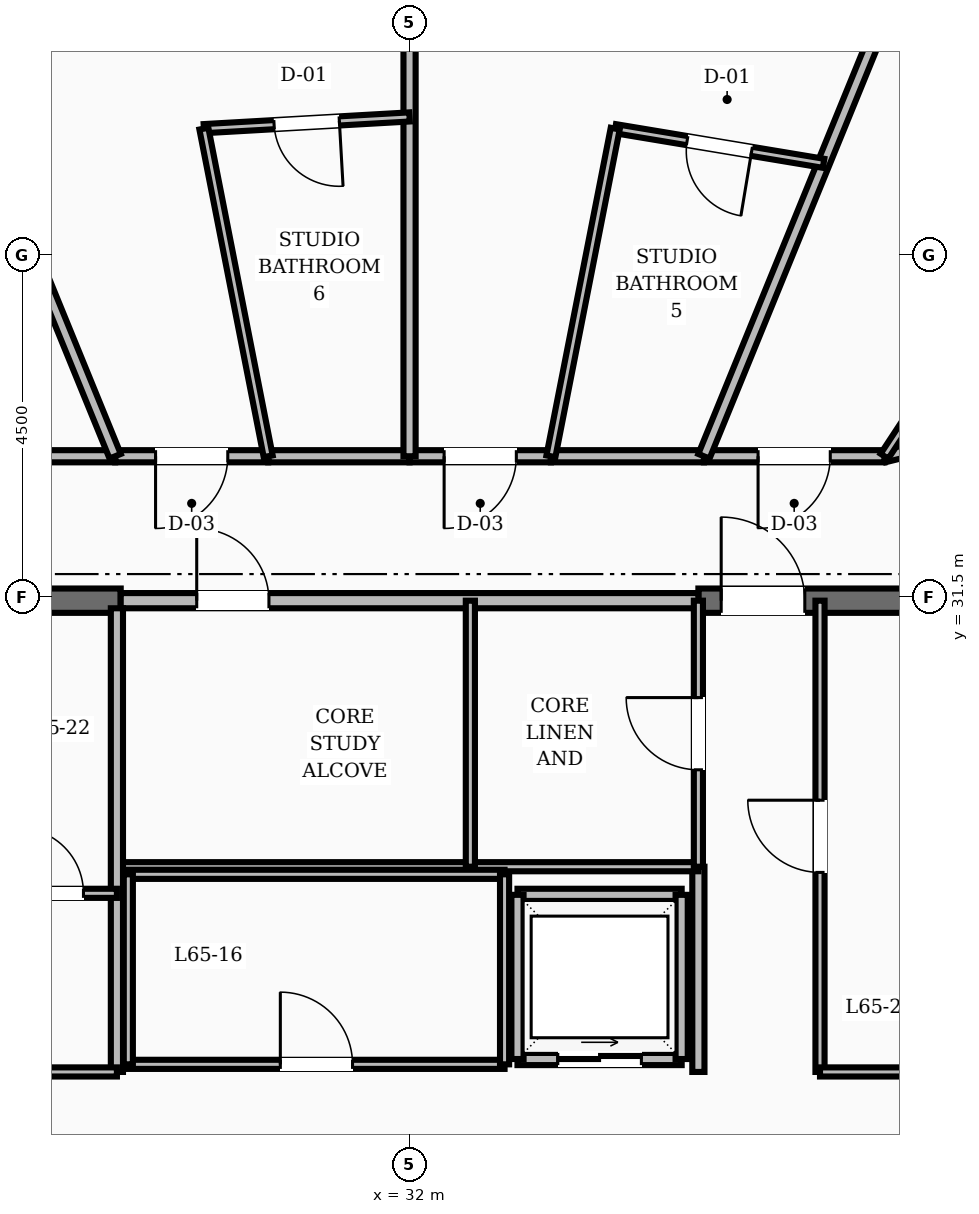
"""IFC4 building model, lengths in metres.
Left out: names, types, materials, properties, quantities, classifications, styles, units other than length and angle.
Written with IfcOpenShell. Run it as: python <this file> out.ifc"""

import sys

from ifc_helpers import new_model, si_unit, direction, frame, frame_2d, origin, place, context, subcontext, project, spatial, rectangle, extrude, element, fill, save


model = new_model("IFC4")
c1 = context("Model", 3, precision=1e-05, world=origin(), true_north=direction((0.0, 1.0)))
c2 = subcontext(c1, "Body", "Model", "MODEL_VIEW")
j1 = project(units=[si_unit("LENGTHUNIT", "METRE"), si_unit("PLANEANGLEUNIT", "RADIAN")], contexts=[c1])
p1 = place(None, origin())
s1 = spatial("IfcSite", under=j1, at=p1, CompositionType="ELEMENT")
p2 = place(p1, origin())
s2 = spatial("IfcBuilding", under=s1, at=p2, CompositionType="ELEMENT")
p3 = place(p2, frame((0.0, 0.0, 250.8)))
s3 = spatial("IfcBuildingStorey", under=s2, at=p3, CompositionType="ELEMENT", Elevation=250.8)
p4 = place(p3, frame((24.96, 31.45, 0.0), z_axis=(0.0, 0.0, 1.0), x_axis=(1.0, 0.0, 0.0)))
e1 = element("IfcWall", 1, at=p4, inside=s3, PredefinedType="SHEAR", context=c2, shape_type="SweptSolid", body=[
    extrude(rectangle(XDim=3.24, YDim=0.32, at=frame_2d((1.62, 0.0))), origin(), (0.0, 0.0, 1.0), 3.6),
])
p5 = place(p3, frame((35.8, 31.45, 0.0), z_axis=(0.0, 0.0, 1.0), x_axis=(1.0, 0.0, 0.0)))
e2 = element("IfcWall", 2, at=p5, inside=s3, PredefinedType="SHEAR", context=c2, shape_type="SweptSolid", body=[
    extrude(rectangle(XDim=3.24, YDim=0.32, at=frame_2d((1.62, 0.0))), origin(), (0.0, 0.0, 1.0), 3.6),
])
p6 = place(p5, frame((0.3, 0.0, 0.0)))
e3 = element("IfcOpeningElement", 3, at=p6, cuts=e2, PredefinedType="OPENING", context=c2, shape_type="SweptSolid", body=[
    extrude(rectangle(XDim=1.1, YDim=2.1, at=frame_2d((0.55, 1.05))), frame((0.0, 0.17, 0.0), z_axis=(0.0, -1.0, 0.0), x_axis=(1.0, 0.0, 0.0)), (0.0, 0.0, 1.0), 0.34),
])
p7 = place(p3, frame((35.8, 25.25, 0.0), z_axis=(0.0, 0.0, 1.0), x_axis=(0.0, 1.0, 0.0)))
e4 = element("IfcWall", 4, at=p7, inside=s3, PredefinedType="SOLIDWALL", context=c2, shape_type="SweptSolid", body=[
    extrude(rectangle(XDim=2.7, YDim=0.16, at=frame_2d((1.35, 0.0))), origin(), (0.0, 0.0, 1.0), 2.87),
])
p8 = place(p3, frame((33.42, 25.42, 0.0), z_axis=(0.0, 0.0, 1.0), x_axis=(1.0, 0.0, 0.0)))
e5 = element("IfcWall", 5, at=p8, inside=s3, PredefinedType="SOLIDWALL", context=c2, shape_type="SweptSolid", body=[
    extrude(rectangle(XDim=2.16, YDim=0.16, at=frame_2d((1.08, 0.0))), origin(), (0.0, 0.0, 1.0), 2.87),
])
p9 = place(p8, frame((0.53, 0.0, 0.0)))
e6 = element("IfcOpeningElement", 6, at=p9, cuts=e5, PredefinedType="OPENING", context=c2, shape_type="SweptSolid", body=[
    extrude(rectangle(XDim=1.1, YDim=2.15, at=frame_2d((0.55, 1.075))), frame((0.0, 0.09, 0.0), z_axis=(0.0, -1.0, 0.0), x_axis=(1.0, 0.0, 0.0)), (0.0, 0.0, 1.0), 0.18),
])
for number, where, z_axis, x_axis in (
    (7, (33.42, 27.58, 0.0), (0.0, 0.0, 1.0), (1.0, 0.0, 0.0)),
    (8, (33.42, 25.42, 0.0), (0.0, 0.0, 1.0), (0.0, 1.0, 0.0)),
    (9, (35.58, 25.42, 0.0), (0.0, 0.0, 1.0), (0.0, 1.0, 0.0)),
):
    element("IfcWall", number, at=place(p3, frame(where, z_axis=z_axis, x_axis=x_axis)), inside=s3, PredefinedType="SOLIDWALL", context=c2, shape_type="SweptSolid", body=[
        extrude(rectangle(XDim=2.16, YDim=0.16, at=frame_2d((1.08, 0.0))), origin(), (0.0, 0.0, 1.0), 2.87),
    ])
p10 = place(p3, frame((28.2, 31.45, 0.0), z_axis=(0.0, 0.0, 1.0), x_axis=(1.0, 0.0, 0.0)))
e10 = element("IfcWall", 10, at=p10, inside=s3, PredefinedType="SOLIDWALL", context=c2, shape_type="SweptSolid", body=[
    extrude(rectangle(XDim=7.6, YDim=0.2, at=frame_2d((3.8, 0.0))), origin(), (0.0, 0.0, 1.0), 2.87),
])
p11 = place(p10, frame((1.0, 0.0, 0.0)))
e11 = element("IfcOpeningElement", 11, at=p11, cuts=e10, PredefinedType="OPENING", context=c2, shape_type="SweptSolid", body=[
    extrude(rectangle(XDim=0.95, YDim=2.1, at=frame_2d((0.475, 1.05))), frame((0.0, 0.11, 0.0), z_axis=(0.0, -1.0, 0.0), x_axis=(1.0, 0.0, 0.0)), (0.0, 0.0, 1.0), 0.22),
])
p12 = place(p3, frame((28.2, 27.95, 0.0), z_axis=(0.0, 0.0, 1.0), x_axis=(1.0, 0.0, 0.0)))
e12 = element("IfcWall", 12, at=p12, inside=s3, PredefinedType="PARTITIONING", context=c2, shape_type="SweptSolid", body=[
    extrude(rectangle(XDim=7.6, YDim=0.12, at=frame_2d((3.8, 0.0))), origin(), (0.0, 0.0, 1.0), 2.87),
])
p13 = place(p3, frame((35.8, 27.95, 0.0), z_axis=(0.0, 0.0, 1.0), x_axis=(0.0, 1.0, 0.0)))
e13 = element("IfcWall", 13, at=p13, inside=s3, PredefinedType="PARTITIONING", context=c2, shape_type="SweptSolid", body=[
    extrude(rectangle(XDim=3.5, YDim=0.12, at=frame_2d((1.75, 0.0))), origin(), (0.0, 0.0, 1.0), 2.87),
])
p14 = place(p13, frame((1.275, 0.0, 0.0)))
e14 = element("IfcOpeningElement", 14, at=p14, cuts=e13, PredefinedType="OPENING", context=c2, shape_type="SweptSolid", body=[
    extrude(rectangle(XDim=0.95, YDim=2.1, at=frame_2d((0.475, 1.05))), frame((0.0, 0.07, 0.0), z_axis=(0.0, -1.0, 0.0), x_axis=(1.0, 0.0, 0.0)), (0.0, 0.0, 1.0), 0.14),
])
p15 = place(p3, frame((32.8, 27.95, 0.0), z_axis=(0.0, 0.0, 1.0), x_axis=(0.0, 1.0, 0.0)))
e15 = element("IfcWall", 15, at=p15, inside=s3, PredefinedType="PARTITIONING", context=c2, shape_type="SweptSolid", body=[
    extrude(rectangle(XDim=3.5, YDim=0.12, at=frame_2d((1.75, 0.0))), origin(), (0.0, 0.0, 1.0), 2.87),
])
p16 = place(p3, frame((28.3, 25.35, 0.0), z_axis=(0.0, 0.0, 1.0), x_axis=(1.0, 0.0, 0.0)))
e16 = element("IfcWall", 16, at=p16, inside=s3, PredefinedType="PARTITIONING", context=c2, shape_type="SweptSolid", body=[
    extrude(rectangle(XDim=4.95, YDim=0.12, at=frame_2d((2.475, 0.0))), origin(), (0.0, 0.0, 1.0), 2.87),
])
p17 = place(p16, frame((2.0, 0.0, 0.0)))
e17 = element("IfcOpeningElement", 17, at=p17, cuts=e16, PredefinedType="OPENING", context=c2, shape_type="SweptSolid", body=[
    extrude(rectangle(XDim=0.95, YDim=2.1, at=frame_2d((0.475, 1.05))), frame((0.0, 0.07, 0.0), z_axis=(0.0, -1.0, 0.0), x_axis=(1.0, 0.0, 0.0)), (0.0, 0.0, 1.0), 0.14),
])
p18 = place(p3, frame((28.3, 27.85, 0.0), z_axis=(0.0, 0.0, 1.0), x_axis=(1.0, 0.0, 0.0)))
e18 = element("IfcWall", 18, at=p18, inside=s3, PredefinedType="PARTITIONING", context=c2, shape_type="SweptSolid", body=[
    extrude(rectangle(XDim=4.95, YDim=0.12, at=frame_2d((2.475, 0.0))), origin(), (0.0, 0.0, 1.0), 2.87),
])
for number, where, z_axis, x_axis in (
    (19, (28.3, 25.35, 0.0), (0.0, 0.0, 1.0), (0.0, 1.0, 0.0)),
    (20, (33.25, 25.35, 0.0), (0.0, 0.0, 1.0), (0.0, 1.0, 0.0)),
):
    element("IfcWall", number, at=place(p3, frame(where, z_axis=z_axis, x_axis=x_axis)), inside=s3, PredefinedType="PARTITIONING", context=c2, shape_type="SweptSolid", body=[
        extrude(rectangle(XDim=2.5, YDim=0.12, at=frame_2d((1.25, 0.0))), origin(), (0.0, 0.0, 1.0), 2.87),
    ])
p19 = place(p3, frame((28.15, 25.25, 0.0), z_axis=(0.0, 0.0, 1.0), x_axis=(0.0, 1.0, 0.0)))
e21 = element("IfcWall", 21, at=p19, inside=s3, PredefinedType="SOLIDWALL", context=c2, shape_type="SweptSolid", body=[
    extrude(rectangle(XDim=6.1, YDim=0.16, at=frame_2d((3.05, 0.0))), origin(), (0.0, 0.0, 1.0), 2.87),
])
p20 = place(p3, frame((24.95, 25.25, 0.0), z_axis=(0.0, 0.0, 1.0), x_axis=(1.0, 0.0, 0.0)))
e22 = element("IfcWall", 22, at=p20, inside=s3, PredefinedType="PARTITIONING", context=c2, shape_type="SweptSolid", body=[
    extrude(rectangle(XDim=3.2, YDim=0.12, at=frame_2d((1.6, 0.0))), origin(), (0.0, 0.0, 1.0), 2.87),
])
p21 = place(p20, frame((1.125, 0.0, 0.0)))
e23 = element("IfcOpeningElement", 23, at=p21, cuts=e22, PredefinedType="OPENING", context=c2, shape_type="SweptSolid", body=[
    extrude(rectangle(XDim=0.95, YDim=2.1, at=frame_2d((0.475, 1.05))), frame((0.0, 0.07, 0.0), z_axis=(0.0, -1.0, 0.0), x_axis=(1.0, 0.0, 0.0)), (0.0, 0.0, 1.0), 0.14),
])
p22 = place(p3, frame((37.4, 25.25, 0.0), z_axis=(0.0, 0.0, 1.0), x_axis=(0.0, 1.0, 0.0)))
e24 = element("IfcWall", 24, at=p22, inside=s3, PredefinedType="PARTITIONING", context=c2, shape_type="SweptSolid", body=[
    extrude(rectangle(XDim=6.2, YDim=0.12, at=frame_2d((3.1, 0.0))), origin(), (0.0, 0.0, 1.0), 2.87),
])
p23 = place(p22, frame((2.625, 0.0, 0.0)))
e25 = element("IfcOpeningElement", 25, at=p23, cuts=e24, PredefinedType="OPENING", context=c2, shape_type="SweptSolid", body=[
    extrude(rectangle(XDim=0.95, YDim=2.1, at=frame_2d((0.475, 1.05))), frame((0.0, 0.07, 0.0), z_axis=(0.0, -1.0, 0.0), x_axis=(1.0, 0.0, 0.0)), (0.0, 0.0, 1.0), 0.14),
])
p24 = place(p3, frame((37.4, 25.25, 0.0), z_axis=(0.0, 0.0, 1.0), x_axis=(1.0, 0.0, 0.0)))
e26 = element("IfcWall", 26, at=p24, inside=s3, PredefinedType="PARTITIONING", context=c2, shape_type="SweptSolid", body=[
    extrude(rectangle(XDim=1.8, YDim=0.12, at=frame_2d((0.9, 0.0))), origin(), (0.0, 0.0, 1.0), 2.87),
])
p25 = place(p3, frame((24.95, 27.6, 0.0), z_axis=(0.0, 0.0, 1.0), x_axis=(1.0, 0.0, 0.0)))
e27 = element("IfcWall", 27, at=p25, inside=s3, PredefinedType="PARTITIONING", context=c2, shape_type="SweptSolid", body=[
    extrude(rectangle(XDim=3.2, YDim=0.12, at=frame_2d((1.6, 0.0))), origin(), (0.0, 0.0, 1.0), 2.87),
])
p26 = place(p25, frame((0.44, 0.0, 0.0)))
e28 = element("IfcOpeningElement", 28, at=p26, cuts=e27, PredefinedType="OPENING", context=c2, shape_type="SweptSolid", body=[
    extrude(rectangle(XDim=0.86, YDim=2.1, at=frame_2d((0.43, 1.05))), frame((0.0, 0.07, 0.0), z_axis=(0.0, -1.0, 0.0), x_axis=(1.0, 0.0, 0.0)), (0.0, 0.0, 1.0), 0.14),
])
p27 = place(p25, frame((1.9, 0.0, 0.0)))
e29 = element("IfcOpeningElement", 29, at=p27, cuts=e27, PredefinedType="OPENING", context=c2, shape_type="SweptSolid", body=[
    extrude(rectangle(XDim=0.86, YDim=2.1, at=frame_2d((0.43, 1.05))), frame((0.0, 0.07, 0.0), z_axis=(0.0, -1.0, 0.0), x_axis=(1.0, 0.0, 0.0)), (0.0, 0.0, 1.0), 0.14),
])
p28 = place(p3, frame((42.365, 34.365, 0.0), z_axis=(0.0, 0.0, 1.0), x_axis=(-0.970939799552, -0.239323850978, 0.0)))
e30 = element("IfcWall", 30, at=p28, inside=s3, PredefinedType="SOLIDWALL", context=c2, shape_type="SweptSolid", body=[
    extrude(rectangle(XDim=4.241, YDim=0.16, at=frame_2d((2.12, 0.0))), origin(), (0.0, 0.0, 1.0), 2.87),
])
p29 = place(p3, frame((38.248, 33.35, 0.0), z_axis=(0.0, 0.0, 1.0), x_axis=(-1.0, 0.0, 0.0)))
e31 = element("IfcWall", 31, at=p29, inside=s3, PredefinedType="SOLIDWALL", context=c2, shape_type="SweptSolid", body=[
    extrude(rectangle(XDim=2.375, YDim=0.16, at=frame_2d((1.188, 0.0))), origin(), (0.0, 0.0, 1.0), 2.87),
])
p30 = place(p29, frame((0.712, 0.0, 0.0)))
e32 = element("IfcOpeningElement", 32, at=p30, cuts=e31, PredefinedType="OPENING", context=c2, shape_type="SweptSolid", body=[
    extrude(rectangle(XDim=0.95, YDim=2.1, at=frame_2d((0.475, 1.05))), frame((0.0, 0.09, 0.0), z_axis=(0.0, -1.0, 0.0), x_axis=(1.0, 0.0, 0.0)), (0.0, 0.0, 1.0), 0.18),
])
p31 = place(p3, frame((35.873, 33.35, 0.0), z_axis=(0.0, 0.0, 1.0), x_axis=(-1.0, 0.0, 0.0)))
e33 = element("IfcWall", 33, at=p31, inside=s3, PredefinedType="SOLIDWALL", context=c2, shape_type="SweptSolid", body=[
    extrude(rectangle(XDim=2.013, YDim=0.16, at=frame_2d((1.006, 0.0))), origin(), (0.0, 0.0, 1.0), 2.87),
])
p32 = place(p3, frame((33.86, 33.35, 0.0), z_axis=(0.0, 0.0, 1.0), x_axis=(-1.0, 0.0, 0.0)))
e34 = element("IfcWall", 34, at=p32, inside=s3, PredefinedType="SOLIDWALL", context=c2, shape_type="SweptSolid", body=[
    extrude(rectangle(XDim=1.86, YDim=0.16, at=frame_2d((0.93, 0.0))), origin(), (0.0, 0.0, 1.0), 2.87),
])
p33 = place(p32, frame((0.455, 0.0, 0.0)))
e35 = element("IfcOpeningElement", 35, at=p33, cuts=e34, PredefinedType="OPENING", context=c2, shape_type="SweptSolid", body=[
    extrude(rectangle(XDim=0.95, YDim=2.1, at=frame_2d((0.475, 1.05))), frame((0.0, 0.09, 0.0), z_axis=(0.0, -1.0, 0.0), x_axis=(1.0, 0.0, 0.0)), (0.0, 0.0, 1.0), 0.18),
])
p34 = place(p3, frame((32.0, 33.35, 0.0), z_axis=(0.0, 0.0, 1.0), x_axis=(-1.0, 0.0, 0.0)))
e36 = element("IfcWall", 36, at=p34, inside=s3, PredefinedType="SOLIDWALL", context=c2, shape_type="SweptSolid", body=[
    extrude(rectangle(XDim=1.86, YDim=0.16, at=frame_2d((0.93, 0.0))), origin(), (0.0, 0.0, 1.0), 2.87),
])
p35 = place(p3, frame((30.14, 33.35, 0.0), z_axis=(0.0, 0.0, 1.0), x_axis=(-1.0, 0.0, 0.0)))
e37 = element("IfcWall", 37, at=p35, inside=s3, PredefinedType="SOLIDWALL", context=c2, shape_type="SweptSolid", body=[
    extrude(rectangle(XDim=2.013, YDim=0.16, at=frame_2d((1.006, 0.0))), origin(), (0.0, 0.0, 1.0), 2.87),
])
p36 = place(p35, frame((0.531, 0.0, 0.0)))
e38 = element("IfcOpeningElement", 38, at=p36, cuts=e37, PredefinedType="OPENING", context=c2, shape_type="SweptSolid", body=[
    extrude(rectangle(XDim=0.95, YDim=2.1, at=frame_2d((0.475, 1.05))), frame((0.0, 0.09, 0.0), z_axis=(0.0, -1.0, 0.0), x_axis=(1.0, 0.0, 0.0)), (0.0, 0.0, 1.0), 0.18),
])
p37 = place(p3, frame((28.127, 33.35, 0.0), z_axis=(0.0, 0.0, 1.0), x_axis=(-1.0, 0.0, 0.0)))
e39 = element("IfcWall", 39, at=p37, inside=s3, PredefinedType="SOLIDWALL", context=c2, shape_type="SweptSolid", body=[
    extrude(rectangle(XDim=2.375, YDim=0.16, at=frame_2d((1.188, 0.0))), origin(), (0.0, 0.0, 1.0), 2.87),
])
p38 = place(p3, frame((38.248, 33.35, 0.0), z_axis=(0.0, 0.0, 1.0), x_axis=(0.549609280911, 0.835421832571, 0.0)))
e40 = element("IfcWall", 40, at=p38, inside=s3, PredefinedType="PARTITIONING", context=c2, shape_type="SweptSolid", body=[
    extrude(rectangle(XDim=3.726, YDim=0.12, at=frame_2d((1.863, 0.0))), origin(), (0.0, 0.0, 1.0), 2.87),
])
p39 = place(p3, frame((35.873, 33.35, 0.0), z_axis=(0.0, 0.0, 1.0), x_axis=(0.378155079747, 0.925742262005, 0.0)))
e41 = element("IfcWall", 41, at=p39, inside=s3, PredefinedType="SOLIDWALL", context=c2, shape_type="SweptSolid", body=[
    extrude(rectangle(XDim=10.905, YDim=0.16, at=frame_2d((5.453, 0.0))), origin(), (0.0, 0.0, 1.0), 2.87),
])
p40 = place(p3, frame((37.447, 37.204, 0.0), z_axis=(0.0, 0.0, 1.0), x_axis=(-0.986441372128, 0.164114043742, 0.0)))
e42 = element("IfcWall", 42, at=p40, inside=s3, PredefinedType="PARTITIONING", context=c2, shape_type="SweptSolid", body=[
    extrude(rectangle(XDim=2.779, YDim=0.12, at=frame_2d((1.389, 0.0))), origin(), (0.0, 0.0, 1.0), 2.87),
])
p41 = place(p40, frame((0.959, 0.0, 0.0)))
e43 = element("IfcOpeningElement", 43, at=p41, cuts=e42, PredefinedType="OPENING", context=c2, shape_type="SweptSolid", body=[
    extrude(rectangle(XDim=0.86, YDim=2.1, at=frame_2d((0.43, 1.05))), frame((0.0, 0.07, 0.0), z_axis=(0.0, -1.0, 0.0), x_axis=(1.0, 0.0, 0.0)), (0.0, 0.0, 1.0), 0.14),
])
p42 = place(p3, frame((33.86, 33.35, 0.0), z_axis=(0.0, 0.0, 1.0), x_axis=(0.192608630394, 0.981275657243, 0.0)))
e44 = element("IfcWall", 44, at=p42, inside=s3, PredefinedType="PARTITIONING", context=c2, shape_type="SweptSolid", body=[
    extrude(rectangle(XDim=4.392, YDim=0.12, at=frame_2d((2.196, 0.0))), origin(), (0.0, 0.0, 1.0), 2.87),
])
p43 = place(p3, frame((32.0, 33.35, 0.0), z_axis=(0.0, 0.0, 1.0), x_axis=(0.0, 1.0, 0.0)))
e45 = element("IfcWall", 45, at=p43, inside=s3, PredefinedType="SOLIDWALL", context=c2, shape_type="SweptSolid", body=[
    extrude(rectangle(XDim=11.698, YDim=0.16, at=frame_2d((5.849, 0.0))), origin(), (0.0, 0.0, 1.0), 2.87),
])
p44 = place(p3, frame((32.0, 37.814, 0.0), z_axis=(0.0, 0.0, 1.0), x_axis=(-0.998378070768, -0.056931782074, 0.0)))
e46 = element("IfcWall", 46, at=p44, inside=s3, PredefinedType="PARTITIONING", context=c2, shape_type="SweptSolid", body=[
    extrude(rectangle(XDim=2.71, YDim=0.12, at=frame_2d((1.355, 0.0))), origin(), (0.0, 0.0, 1.0), 2.87),
])
p45 = place(p44, frame((0.925, 0.0, 0.0)))
e47 = element("IfcOpeningElement", 47, at=p45, cuts=e46, PredefinedType="OPENING", context=c2, shape_type="SweptSolid", body=[
    extrude(rectangle(XDim=0.86, YDim=2.1, at=frame_2d((0.43, 1.05))), frame((0.0, 0.07, 0.0), z_axis=(0.0, -1.0, 0.0), x_axis=(1.0, 0.0, 0.0)), (0.0, 0.0, 1.0), 0.14),
])
p46 = place(p3, frame((30.14, 33.35, 0.0), z_axis=(0.0, 0.0, 1.0), x_axis=(-0.192608630394, 0.981275657243, 0.0)))
e48 = element("IfcWall", 48, at=p46, inside=s3, PredefinedType="PARTITIONING", context=c2, shape_type="SweptSolid", body=[
    extrude(rectangle(XDim=4.392, YDim=0.12, at=frame_2d((2.196, 0.0))), origin(), (0.0, 0.0, 1.0), 2.87),
])
p47 = place(p3, frame((28.127, 33.35, 0.0), z_axis=(0.0, 0.0, 1.0), x_axis=(-0.378155079747, 0.925742262005, 0.0)))
e49 = element("IfcWall", 49, at=p47, inside=s3, PredefinedType="SOLIDWALL", context=c2, shape_type="SweptSolid", body=[
    extrude(rectangle(XDim=10.905, YDim=0.16, at=frame_2d((5.453, 0.0))), origin(), (0.0, 0.0, 1.0), 2.87),
])
p48 = place(p6, origin())
e50 = element("IfcDoor", 50, at=p48, inside=s3, OperationType="SINGLE_SWING_LEFT", PredefinedType="DOOR", context=c2, shape_type="SweptSolid", body=[
    extrude(rectangle(XDim=1.1, YDim=2.1, at=frame_2d((0.55, 1.05))), frame((0.0, 0.025, 0.0), z_axis=(0.0, -1.0, 0.0), x_axis=(1.0, 0.0, 0.0)), (0.0, 0.0, 1.0), 0.05),
])
fill(e3, e50)
p49 = place(p9, origin())
e51 = element("IfcDoor", 51, at=p49, inside=s3, OperationType="SLIDING_TO_RIGHT", PredefinedType="DOOR", context=c2, shape_type="SweptSolid", body=[
    extrude(rectangle(XDim=1.1, YDim=2.15, at=frame_2d((0.55, 1.075))), frame((0.0, 0.025, 0.0), z_axis=(0.0, -1.0, 0.0), x_axis=(1.0, 0.0, 0.0)), (0.0, 0.0, 1.0), 0.05),
])
fill(e6, e51)
p50 = place(p11, origin())
e52 = element("IfcDoor", 52, at=p50, inside=s3, OperationType="SINGLE_SWING_LEFT", PredefinedType="DOOR", context=c2, shape_type="SweptSolid", body=[
    extrude(rectangle(XDim=0.95, YDim=2.1, at=frame_2d((0.475, 1.05))), frame((0.0, 0.025, 0.0), z_axis=(0.0, -1.0, 0.0), x_axis=(1.0, 0.0, 0.0)), (0.0, 0.0, 1.0), 0.05),
])
fill(e11, e52)
p51 = place(p14, origin())
e53 = element("IfcDoor", 53, at=p51, inside=s3, OperationType="SINGLE_SWING_RIGHT", PredefinedType="DOOR", context=c2, shape_type="SweptSolid", body=[
    extrude(rectangle(XDim=0.95, YDim=2.1, at=frame_2d((0.475, 1.05))), frame((0.0, 0.025, 0.0), z_axis=(0.0, -1.0, 0.0), x_axis=(1.0, 0.0, 0.0)), (0.0, 0.0, 1.0), 0.05),
])
fill(e14, e53)
p52 = place(p17, origin())
e54 = element("IfcDoor", 54, at=p52, inside=s3, OperationType="SINGLE_SWING_LEFT", PredefinedType="DOOR", context=c2, shape_type="SweptSolid", body=[
    extrude(rectangle(XDim=0.95, YDim=2.1, at=frame_2d((0.475, 1.05))), frame((0.0, 0.025, 0.0), z_axis=(0.0, -1.0, 0.0), x_axis=(1.0, 0.0, 0.0)), (0.0, 0.0, 1.0), 0.05),
])
fill(e17, e54)
p53 = place(p27, origin())
e55 = element("IfcDoor", 55, at=p53, inside=s3, OperationType="SINGLE_SWING_LEFT", PredefinedType="DOOR", context=c2, shape_type="SweptSolid", body=[
    extrude(rectangle(XDim=0.86, YDim=2.1, at=frame_2d((0.43, 1.05))), frame((0.0, 0.025, 0.0), z_axis=(0.0, -1.0, 0.0), x_axis=(1.0, 0.0, 0.0)), (0.0, 0.0, 1.0), 0.05),
])
fill(e29, e55)
p54 = place(p23, origin())
e56 = element("IfcDoor", 56, at=p54, inside=s3, OperationType="SINGLE_SWING_RIGHT", PredefinedType="DOOR", context=c2, shape_type="SweptSolid", body=[
    extrude(rectangle(XDim=0.95, YDim=2.1, at=frame_2d((0.475, 1.05))), frame((0.0, 0.025, 0.0), z_axis=(0.0, -1.0, 0.0), x_axis=(1.0, 0.0, 0.0)), (0.0, 0.0, 1.0), 0.05),
])
fill(e25, e56)
p55 = place(p30, origin())
e57 = element("IfcDoor", 57, at=p55, inside=s3, OperationType="SINGLE_SWING_RIGHT", PredefinedType="DOOR", context=c2, shape_type="SweptSolid", body=[
    extrude(rectangle(XDim=0.95, YDim=2.1, at=frame_2d((0.475, 1.05))), frame((0.0, 0.025, 0.0), z_axis=(0.0, -1.0, 0.0), x_axis=(1.0, 0.0, 0.0)), (0.0, 0.0, 1.0), 0.05),
])
fill(e32, e57)
p56 = place(p41, origin())
e58 = element("IfcDoor", 58, at=p56, inside=s3, OperationType="SINGLE_SWING_LEFT", PredefinedType="DOOR", context=c2, shape_type="SweptSolid", body=[
    extrude(rectangle(XDim=0.86, YDim=2.1, at=frame_2d((0.43, 1.05))), frame((0.0, 0.025, 0.0), z_axis=(0.0, -1.0, 0.0), x_axis=(1.0, 0.0, 0.0)), (0.0, 0.0, 1.0), 0.05),
])
fill(e43, e58)
p57 = place(p33, origin())
e59 = element("IfcDoor", 59, at=p57, inside=s3, OperationType="SINGLE_SWING_RIGHT", PredefinedType="DOOR", context=c2, shape_type="SweptSolid", body=[
    extrude(rectangle(XDim=0.95, YDim=2.1, at=frame_2d((0.475, 1.05))), frame((0.0, 0.025, 0.0), z_axis=(0.0, -1.0, 0.0), x_axis=(1.0, 0.0, 0.0)), (0.0, 0.0, 1.0), 0.05),
])
fill(e35, e59)
p58 = place(p45, origin())
e60 = element("IfcDoor", 60, at=p58, inside=s3, OperationType="SINGLE_SWING_LEFT", PredefinedType="DOOR", context=c2, shape_type="SweptSolid", body=[
    extrude(rectangle(XDim=0.86, YDim=2.1, at=frame_2d((0.43, 1.05))), frame((0.0, 0.025, 0.0), z_axis=(0.0, -1.0, 0.0), x_axis=(1.0, 0.0, 0.0)), (0.0, 0.0, 1.0), 0.05),
])
fill(e47, e60)
p59 = place(p36, origin())
e61 = element("IfcDoor", 61, at=p59, inside=s3, OperationType="SINGLE_SWING_RIGHT", PredefinedType="DOOR", context=c2, shape_type="SweptSolid", body=[
    extrude(rectangle(XDim=0.95, YDim=2.1, at=frame_2d((0.475, 1.05))), frame((0.0, 0.025, 0.0), z_axis=(0.0, -1.0, 0.0), x_axis=(1.0, 0.0, 0.0)), (0.0, 0.0, 1.0), 0.05),
])
fill(e38, e61)
save(model, sys.argv[1])
